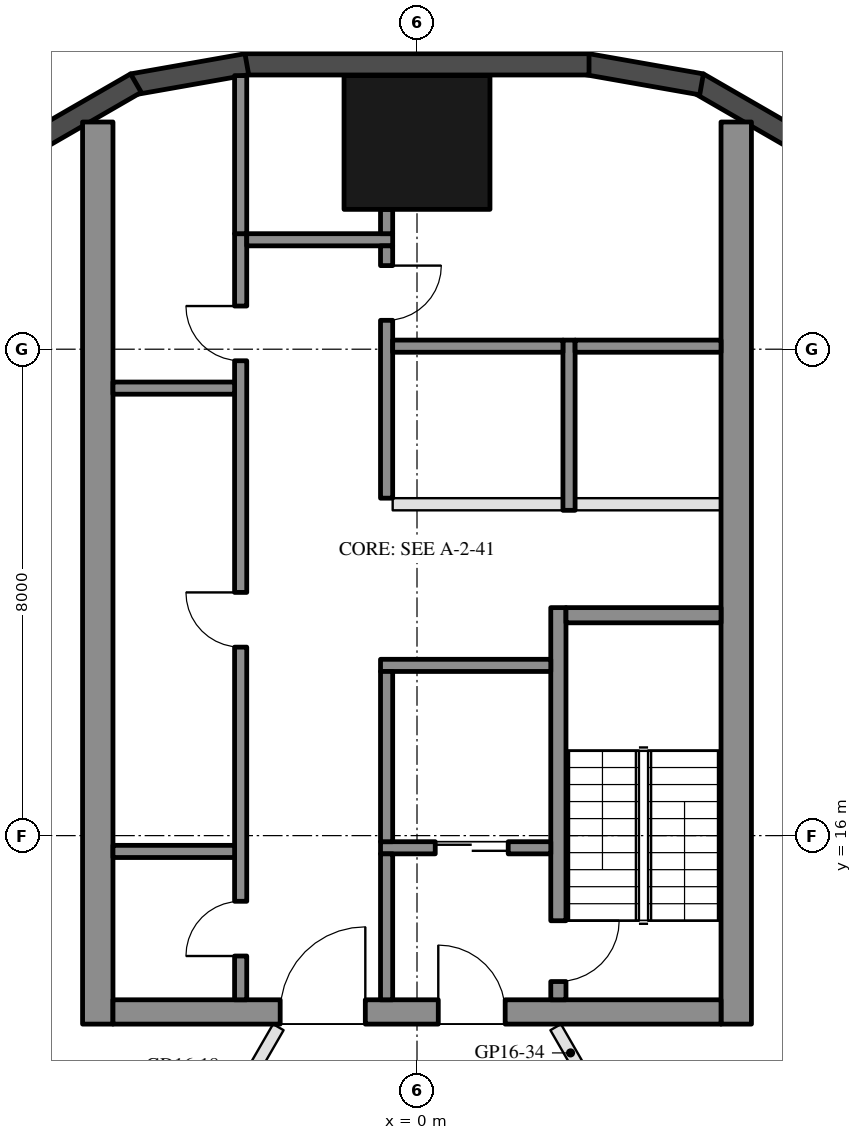
"""IFC4 building model, lengths in metres.
Left out: names, types, materials, properties, quantities, classifications, styles, units other than length and angle.
Written with IfcOpenShell. Run it as: python <this file> out.ifc"""

import sys

from ifc_helpers import new_model, si_unit, direction, frame, frame_2d, origin, origin_2d, place, context, subcontext, project, spatial, rectangle, hollow_rectangle, extrude, element, fill, save


model = new_model("IFC4")
c1 = context("Model", 3, precision=1e-05, world=origin(), true_north=direction((0.0, 1.0)))
c2 = subcontext(c1, "Body", "Model", "MODEL_VIEW")
j1 = project(units=[si_unit("LENGTHUNIT", "METRE"), si_unit("PLANEANGLEUNIT", "RADIAN")], contexts=[c1])
p1 = place(None, origin())
s1 = spatial("IfcSite", under=j1, at=p1, CompositionType="ELEMENT")
p2 = place(p1, origin())
s2 = spatial("IfcBuilding", under=s1, at=p2, CompositionType="ELEMENT")
p3 = place(p2, frame((0.0, 0.0, 176.2)))
s3 = spatial("IfcBuildingStorey", under=s2, at=p3, CompositionType="ELEMENT", Elevation=176.2)
p4 = place(p3, frame((0.0, 27.4, 0.0), z_axis=(0.0, 0.0, 1.0), x_axis=(1.0, 0.0, 0.0)))
e1 = element("IfcColumn", 1, at=p4, inside=s3, PredefinedType="COLUMN", context=c2, shape_type="SweptSolid", body=[
    extrude(hollow_rectangle(XDim=2.4, YDim=2.2, WallThickness=0.06, at=origin_2d()), origin(), (0.0, 0.0, 1.0), 3.7),
])
for number, where, z_axis, x_axis in (
    (2, (6.277, 27.422, 0.0), (0.0, 0.0, 1.0), (-0.866, 0.5, 0.0)),
    (3, (4.68, 28.356, 0.0), (0.0, 0.0, 1.0), (-0.985, 0.174, 0.0)),
):
    element("IfcWall", number, at=place(p3, frame(where, z_axis=z_axis, x_axis=x_axis)), inside=s3, PredefinedType="SOLIDWALL", context=c2, shape_type="SweptSolid", body=[
        extrude(rectangle(XDim=1.91, YDim=0.35, at=frame_2d((0.955, 0.0))), origin(), (0.0, 0.0, 1.0), 3.55),
    ])
p5 = place(p3, frame((2.829, 28.685, 0.0), z_axis=(0.0, 0.0, 1.0), x_axis=(-1.0, 0.0, 0.0)))
e4 = element("IfcWall", 4, at=p5, inside=s3, PredefinedType="SOLIDWALL", context=c2, shape_type="SweptSolid", body=[
    extrude(rectangle(XDim=5.658, YDim=0.35, at=frame_2d((2.829, 0.0))), origin(), (0.0, 0.0, 1.0), 3.55),
])
for number, where, z_axis, x_axis in (
    (5, (-2.799, 28.688, 0.0), (0.0, 0.0, 1.0), (-0.985, -0.174, 0.0)),
    (6, (-4.623, 28.377, 0.0), (0.0, 0.0, 1.0), (-0.866, -0.5, 0.0)),
):
    element("IfcWall", number, at=place(p3, frame(where, z_axis=z_axis, x_axis=x_axis)), inside=s3, PredefinedType="SOLIDWALL", context=c2, shape_type="SweptSolid", body=[
        extrude(rectangle(XDim=1.91, YDim=0.35, at=frame_2d((0.955, 0.0))), origin(), (0.0, 0.0, 1.0), 3.55),
    ])
for number, where, z_axis, x_axis in (
    (7, (5.25, 12.9, 0.0), (0.0, 0.0, 1.0), (0.0, 1.0, 0.0)),
    (8, (-5.25, 12.9, 0.0), (0.0, 0.0, 1.0), (0.0, 1.0, 0.0)),
):
    element("IfcWall", number, at=place(p3, frame(where, z_axis=z_axis, x_axis=x_axis)), inside=s3, PredefinedType="SHEAR", context=c2, shape_type="SweptSolid", body=[
        extrude(rectangle(XDim=14.837, YDim=0.5, at=frame_2d((7.418, 0.0))), origin(), (0.0, 0.0, 1.0), 3.5),
    ])
p6 = place(p3, frame((5.0, 13.1, 0.0), z_axis=(0.0, 0.0, 1.0), x_axis=(-1.0, 0.0, 0.0)))
e9 = element("IfcWall", 9, at=p6, inside=s3, PredefinedType="SHEAR", context=c2, shape_type="SweptSolid", body=[
    extrude(rectangle(XDim=10.0, YDim=0.4, at=frame_2d((5.0, 0.0))), origin(), (0.0, 0.0, 1.0), 3.5),
])
p7 = place(p6, frame((3.55, 0.0, 0.0)))
e10 = element("IfcOpeningElement", 10, at=p7, cuts=e9, PredefinedType="OPENING", context=c2, shape_type="SweptSolid", body=[
    extrude(rectangle(XDim=1.1, YDim=2.1, at=frame_2d((0.55, 1.05))), frame((0.0, 0.21, 0.0), z_axis=(0.0, -1.0, 0.0), x_axis=(1.0, 0.0, 0.0)), (0.0, 0.0, 1.0), 0.42),
])
p8 = place(p6, frame((5.85, 0.0, 0.0)))
e11 = element("IfcOpeningElement", 11, at=p8, cuts=e9, PredefinedType="OPENING", context=c2, shape_type="SweptSolid", body=[
    extrude(rectangle(XDim=1.4, YDim=2.1, at=frame_2d((0.7, 1.05))), frame((0.0, 0.21, 0.0), z_axis=(0.0, -1.0, 0.0), x_axis=(1.0, 0.0, 0.0)), (0.0, 0.0, 1.0), 0.42),
])
p9 = place(p3, frame((2.325, 13.3, 0.0), z_axis=(0.0, 0.0, 1.0), x_axis=(0.0, 1.0, 0.0)))
e12 = element("IfcWall", 12, at=p9, inside=s3, PredefinedType="SHEAR", context=c2, shape_type="SweptSolid", body=[
    extrude(rectangle(XDim=6.45, YDim=0.25, at=frame_2d((3.225, 0.0))), origin(), (0.0, 0.0, 1.0), 3.5),
])
p10 = place(p9, frame((0.3, 0.0, 0.0)))
e13 = element("IfcOpeningElement", 13, at=p10, cuts=e12, PredefinedType="OPENING", context=c2, shape_type="SweptSolid", body=[
    extrude(rectangle(XDim=1.0, YDim=2.1, at=frame_2d((0.5, 1.05))), frame((0.0, 0.135, 0.0), z_axis=(0.0, -1.0, 0.0), x_axis=(1.0, 0.0, 0.0)), (0.0, 0.0, 1.0), 0.27),
])
p11 = place(p3, frame((5.0, 19.625, 0.0), z_axis=(0.0, 0.0, 1.0), x_axis=(-1.0, 0.0, 0.0)))
e14 = element("IfcWall", 14, at=p11, inside=s3, PredefinedType="SHEAR", context=c2, shape_type="SweptSolid", body=[
    extrude(rectangle(XDim=2.55, YDim=0.25, at=frame_2d((1.275, 0.0))), origin(), (0.0, 0.0, 1.0), 3.5),
])
p12 = place(p3, frame((2.2, 18.8, 0.0), z_axis=(0.0, 0.0, 1.0), x_axis=(-1.0, 0.0, 0.0)))
e15 = element("IfcWall", 15, at=p12, inside=s3, PredefinedType="SHEAR", context=c2, shape_type="SweptSolid", body=[
    extrude(rectangle(XDim=2.8, YDim=0.2, at=frame_2d((1.4, 0.0))), origin(), (0.0, 0.0, 1.0), 3.5),
])
p13 = place(p3, frame((2.2, 15.8, 0.0), z_axis=(0.0, 0.0, 1.0), x_axis=(-1.0, 0.0, 0.0)))
e16 = element("IfcWall", 16, at=p13, inside=s3, PredefinedType="SHEAR", context=c2, shape_type="SweptSolid", body=[
    extrude(rectangle(XDim=2.8, YDim=0.2, at=frame_2d((1.4, 0.0))), origin(), (0.0, 0.0, 1.0), 3.5),
])
p14 = place(p13, frame((0.7, 0.0, 0.0)))
e17 = element("IfcOpeningElement", 17, at=p14, cuts=e16, PredefinedType="OPENING", context=c2, shape_type="SweptSolid", body=[
    extrude(rectangle(XDim=1.2, YDim=2.1, at=frame_2d((0.6, 1.05))), frame((0.0, 0.11, 0.0), z_axis=(0.0, -1.0, 0.0), x_axis=(1.0, 0.0, 0.0)), (0.0, 0.0, 1.0), 0.22),
])
p15 = place(p3, frame((-0.5, 15.9, 0.0), z_axis=(0.0, 0.0, 1.0), x_axis=(0.0, 1.0, 0.0)))
e18 = element("IfcWall", 18, at=p15, inside=s3, PredefinedType="SHEAR", context=c2, shape_type="SweptSolid", body=[
    extrude(rectangle(XDim=2.8, YDim=0.2, at=frame_2d((1.4, 0.0))), origin(), (0.0, 0.0, 1.0), 3.5),
])
p16 = place(p3, frame((-0.5, 13.3, 0.0), z_axis=(0.0, 0.0, 1.0), x_axis=(0.0, 1.0, 0.0)))
e19 = element("IfcWall", 19, at=p16, inside=s3, PredefinedType="SHEAR", context=c2, shape_type="SweptSolid", body=[
    extrude(rectangle(XDim=2.4, YDim=0.2, at=frame_2d((1.2, 0.0))), origin(), (0.0, 0.0, 1.0), 3.5),
])
p17 = place(p3, frame((-2.9, 13.3, 0.0), z_axis=(0.0, 0.0, 1.0), x_axis=(0.0, 1.0, 0.0)))
e20 = element("IfcWall", 20, at=p17, inside=s3, PredefinedType="SHEAR", context=c2, shape_type="SweptSolid", body=[
    extrude(rectangle(XDim=12.6, YDim=0.2, at=frame_2d((6.3, 0.0))), origin(), (0.0, 0.0, 1.0), 3.5),
])
p18 = place(p17, frame((0.72, 0.0, 0.0)))
e21 = element("IfcOpeningElement", 21, at=p18, cuts=e20, PredefinedType="OPENING", context=c2, shape_type="SweptSolid", body=[
    extrude(rectangle(XDim=0.9, YDim=2.1, at=frame_2d((0.45, 1.05))), frame((0.0, 0.11, 0.0), z_axis=(0.0, -1.0, 0.0), x_axis=(1.0, 0.0, 0.0)), (0.0, 0.0, 1.0), 0.22),
])
p19 = place(p17, frame((5.8, 0.0, 0.0)))
e22 = element("IfcOpeningElement", 22, at=p19, cuts=e20, PredefinedType="OPENING", context=c2, shape_type="SweptSolid", body=[
    extrude(rectangle(XDim=0.9, YDim=2.1, at=frame_2d((0.45, 1.05))), frame((0.0, 0.11, 0.0), z_axis=(0.0, -1.0, 0.0), x_axis=(1.0, 0.0, 0.0)), (0.0, 0.0, 1.0), 0.22),
])
p20 = place(p17, frame((10.51, 0.0, 0.0)))
e23 = element("IfcOpeningElement", 23, at=p20, cuts=e20, PredefinedType="OPENING", context=c2, shape_type="SweptSolid", body=[
    extrude(rectangle(XDim=0.9, YDim=2.1, at=frame_2d((0.45, 1.05))), frame((0.0, 0.11, 0.0), z_axis=(0.0, -1.0, 0.0), x_axis=(1.0, 0.0, 0.0)), (0.0, 0.0, 1.0), 0.22),
])
p21 = place(p3, frame((-0.4, 25.8, 0.0), z_axis=(0.0, 0.0, 1.0), x_axis=(-1.0, 0.0, 0.0)))
e24 = element("IfcWall", 24, at=p21, inside=s3, PredefinedType="SHEAR", context=c2, shape_type="SweptSolid", body=[
    extrude(rectangle(XDim=2.4, YDim=0.2, at=frame_2d((1.2, 0.0))), origin(), (0.0, 0.0, 1.0), 3.5),
])
p22 = place(p3, frame((-0.5, 21.55, 0.0), z_axis=(0.0, 0.0, 1.0), x_axis=(0.0, 1.0, 0.0)))
e25 = element("IfcWall", 25, at=p22, inside=s3, PredefinedType="SHEAR", context=c2, shape_type="SweptSolid", body=[
    extrude(rectangle(XDim=4.15, YDim=0.2, at=frame_2d((2.075, 0.0))), origin(), (0.0, 0.0, 1.0), 3.5),
])
p23 = place(p22, frame((2.925, 0.0, 0.0)))
e26 = element("IfcOpeningElement", 26, at=p23, cuts=e25, PredefinedType="OPENING", context=c2, shape_type="SweptSolid", body=[
    extrude(rectangle(XDim=0.9, YDim=2.1, at=frame_2d((0.45, 1.05))), frame((0.0, 0.11, 0.0), z_axis=(0.0, -1.0, 0.0), x_axis=(1.0, 0.0, 0.0)), (0.0, 0.0, 1.0), 0.22),
])
for number, where, z_axis, x_axis in (
    (27, (-3.0, 15.74, 0.0), (0.0, 0.0, 1.0), (-1.0, 0.0, 0.0)),
    (28, (-3.0, 23.36, 0.0), (0.0, 0.0, 1.0), (-1.0, 0.0, 0.0)),
):
    element("IfcWall", number, at=place(p3, frame(where, z_axis=z_axis, x_axis=x_axis)), inside=s3, PredefinedType="SHEAR", context=c2, shape_type="SweptSolid", body=[
        extrude(rectangle(XDim=2.0, YDim=0.2, at=frame_2d((1.0, 0.0))), origin(), (0.0, 0.0, 1.0), 3.5),
    ])
p24 = place(p3, frame((-0.5, 25.9, 0.0), z_axis=(0.0, 0.0, 1.0), x_axis=(0.0, 1.0, 0.0)))
e29 = element("IfcWall", 29, at=p24, inside=s3, PredefinedType="SHEAR", context=c2, shape_type="SweptSolid", body=[
    extrude(rectangle(XDim=0.4, YDim=0.2, at=frame_2d((0.2, 0.0))), origin(), (0.0, 0.0, 1.0), 3.5),
])
p25 = place(p3, frame((-2.9, 25.9, 0.0), z_axis=(0.0, 0.0, 1.0), x_axis=(0.0, 1.0, 0.0)))
e30 = element("IfcWall", 30, at=p25, inside=s3, PredefinedType="SHEAR", context=c2, shape_type="SweptSolid", body=[
    extrude(rectangle(XDim=2.6, YDim=0.2, at=frame_2d((1.3, 0.0))), origin(), (0.0, 0.0, 1.0), 3.5),
])
p26 = place(p3, frame((2.5, 21.35, 0.0), z_axis=(0.0, 0.0, 1.0), x_axis=(0.0, 1.0, 0.0)))
e31 = element("IfcWall", 31, at=p26, inside=s3, PredefinedType="SHEAR", context=c2, shape_type="SweptSolid", body=[
    extrude(rectangle(XDim=2.8, YDim=0.2, at=frame_2d((1.4, 0.0))), origin(), (0.0, 0.0, 1.0), 3.5),
])
p27 = place(p3, frame((5.0, 24.05, 0.0), z_axis=(0.0, 0.0, 1.0), x_axis=(-1.0, 0.0, 0.0)))
e32 = element("IfcWall", 32, at=p27, inside=s3, PredefinedType="SHEAR", context=c2, shape_type="SweptSolid", body=[
    extrude(rectangle(XDim=2.4, YDim=0.2, at=frame_2d((1.2, 0.0))), origin(), (0.0, 0.0, 1.0), 3.5),
])
p28 = place(p3, frame((2.4, 24.05, 0.0), z_axis=(0.0, 0.0, 1.0), x_axis=(-1.0, 0.0, 0.0)))
e33 = element("IfcWall", 33, at=p28, inside=s3, PredefinedType="SHEAR", context=c2, shape_type="SweptSolid", body=[
    extrude(rectangle(XDim=2.8, YDim=0.2, at=frame_2d((1.4, 0.0))), origin(), (0.0, 0.0, 1.0), 3.5),
])
p29 = place(p3, frame((5.0, 21.45, 0.0), z_axis=(0.0, 0.0, 1.0), x_axis=(-1.0, 0.0, 0.0)))
e34 = element("IfcWall", 34, at=p29, inside=s3, PredefinedType="PARTITIONING", context=c2, shape_type="SweptSolid", body=[
    extrude(rectangle(XDim=2.4, YDim=0.2, at=frame_2d((1.2, 0.0))), origin(), (0.0, 0.0, 1.0), 3.5),
])
p30 = place(p3, frame((2.4, 21.45, 0.0), z_axis=(0.0, 0.0, 1.0), x_axis=(-1.0, 0.0, 0.0)))
e35 = element("IfcWall", 35, at=p30, inside=s3, PredefinedType="PARTITIONING", context=c2, shape_type="SweptSolid", body=[
    extrude(rectangle(XDim=2.8, YDim=0.2, at=frame_2d((1.4, 0.0))), origin(), (0.0, 0.0, 1.0), 3.5),
])
p31 = place(p3, frame((14.377, 13.658, 0.0), z_axis=(0.0, 0.0, 1.0), x_axis=(-0.914546661299, -0.404480412762, 0.0)))
e36 = element("IfcWall", 36, at=p31, inside=s3, PredefinedType="PARTITIONING", context=c2, shape_type="SweptSolid", body=[
    extrude(rectangle(XDim=11.043, YDim=0.2, at=frame_2d((5.521, 0.0))), origin(), (0.0, 0.0, 1.0), 3.06),
])
p32 = place(p3, frame((-13.467, 13.434, 0.0), z_axis=(0.0, 0.0, 1.0), x_axis=(0.916026348045, -0.401118099426, 0.0)))
e37 = element("IfcWall", 37, at=p32, inside=s3, PredefinedType="PARTITIONING", context=c2, shape_type="SweptSolid", body=[
    extrude(rectangle(XDim=10.142, YDim=0.2, at=frame_2d((5.071, 0.0))), origin(), (0.0, 0.0, 1.0), 3.06),
])
p33 = place(p3, frame((2.281, 12.85, 0.0), z_axis=(0.0, 0.0, 1.0), x_axis=(0.499971273698, -0.866041988288, 0.0)))
e38 = element("IfcWall", 38, at=p33, inside=s3, PredefinedType="PARTITIONING", context=c2, shape_type="SweptSolid", body=[
    extrude(rectangle(XDim=4.077, YDim=0.2, at=frame_2d((2.039, 0.0))), origin(), (0.0, 0.0, 1.0), 2.95),
])
p34 = place(p33, frame((1.538, 0.0, 0.0)))
e39 = element("IfcOpeningElement", 39, at=p34, cuts=e38, PredefinedType="OPENING", context=c2, shape_type="SweptSolid", body=[
    extrude(rectangle(XDim=1.0, YDim=2.1, at=frame_2d((0.5, 1.05))), frame((0.0, 0.11, 0.0), z_axis=(0.0, -1.0, 0.0), x_axis=(1.0, 0.0, 0.0)), (0.0, 0.0, 1.0), 0.22),
])
p35 = place(p3, frame((-4.219, 9.493, 0.0), z_axis=(0.0, 0.0, 1.0), x_axis=(0.499993219391, 0.866029318535, 0.0)))
e40 = element("IfcWall", 40, at=p35, inside=s3, PredefinedType="PARTITIONING", context=c2, shape_type="SweptSolid", body=[
    extrude(rectangle(XDim=3.876, YDim=0.2, at=frame_2d((1.938, 0.0))), origin(), (0.0, 0.0, 1.0), 2.95),
])
p36 = place(p35, frame((1.438, 0.0, 0.0)))
e41 = element("IfcOpeningElement", 41, at=p36, cuts=e40, PredefinedType="OPENING", context=c2, shape_type="SweptSolid", body=[
    extrude(rectangle(XDim=1.0, YDim=2.1, at=frame_2d((0.5, 1.05))), frame((0.0, 0.11, 0.0), z_axis=(0.0, -1.0, 0.0), x_axis=(1.0, 0.0, 0.0)), (0.0, 0.0, 1.0), 0.22),
])
p37 = place(p14, origin())
e42 = element("IfcDoor", 42, at=p37, inside=s3, OperationType="DOUBLE_DOOR_SLIDING", PredefinedType="DOOR", context=c2, shape_type="SweptSolid", body=[
    extrude(rectangle(XDim=1.2, YDim=2.1, at=frame_2d((0.6, 1.05))), frame((0.0, 0.025, 0.0), z_axis=(0.0, -1.0, 0.0), x_axis=(1.0, 0.0, 0.0)), (0.0, 0.0, 1.0), 0.05),
])
fill(e17, e42)
p38 = place(p18, origin())
e43 = element("IfcDoor", 43, at=p38, inside=s3, OperationType="SINGLE_SWING_LEFT", PredefinedType="DOOR", context=c2, shape_type="SweptSolid", body=[
    extrude(rectangle(XDim=0.9, YDim=2.1, at=frame_2d((0.45, 1.05))), frame((0.0, 0.025, 0.0), z_axis=(0.0, -1.0, 0.0), x_axis=(1.0, 0.0, 0.0)), (0.0, 0.0, 1.0), 0.05),
])
fill(e21, e43)
p39 = place(p19, origin())
e44 = element("IfcDoor", 44, at=p39, inside=s3, OperationType="SINGLE_SWING_RIGHT", PredefinedType="DOOR", context=c2, shape_type="SweptSolid", body=[
    extrude(rectangle(XDim=0.9, YDim=2.1, at=frame_2d((0.45, 1.05))), frame((0.0, 0.025, 0.0), z_axis=(0.0, -1.0, 0.0), x_axis=(1.0, 0.0, 0.0)), (0.0, 0.0, 1.0), 0.05),
])
fill(e22, e44)
p40 = place(p20, origin())
e45 = element("IfcDoor", 45, at=p40, inside=s3, OperationType="SINGLE_SWING_RIGHT", PredefinedType="DOOR", context=c2, shape_type="SweptSolid", body=[
    extrude(rectangle(XDim=0.9, YDim=2.1, at=frame_2d((0.45, 1.05))), frame((0.0, 0.025, 0.0), z_axis=(0.0, -1.0, 0.0), x_axis=(1.0, 0.0, 0.0)), (0.0, 0.0, 1.0), 0.05),
])
fill(e23, e45)
p41 = place(p23, frame((0.9, 0.0, 0.0), z_axis=(0.0, 0.0, 1.0), x_axis=(-1.0, 0.0, 0.0)))
e46 = element("IfcDoor", 46, at=p41, inside=s3, OperationType="SINGLE_SWING_LEFT", PredefinedType="DOOR", context=c2, shape_type="SweptSolid", body=[
    extrude(rectangle(XDim=0.9, YDim=2.1, at=frame_2d((0.45, 1.05))), frame((0.0, 0.025, 0.0), z_axis=(0.0, -1.0, 0.0), x_axis=(1.0, 0.0, 0.0)), (0.0, 0.0, 1.0), 0.05),
])
fill(e26, e46)
p42 = place(p7, frame((1.1, 0.0, 0.0), z_axis=(0.0, 0.0, 1.0), x_axis=(-1.0, 0.0, 0.0)))
e47 = element("IfcDoor", 47, at=p42, inside=s3, OperationType="SINGLE_SWING_LEFT", PredefinedType="DOOR", context=c2, shape_type="SweptSolid", body=[
    extrude(rectangle(XDim=1.1, YDim=2.1, at=frame_2d((0.55, 1.05))), frame((0.0, 0.025, 0.0), z_axis=(0.0, -1.0, 0.0), x_axis=(1.0, 0.0, 0.0)), (0.0, 0.0, 1.0), 0.05),
])
fill(e10, e47)
p43 = place(p8, frame((1.4, 0.0, 0.0), z_axis=(0.0, 0.0, 1.0), x_axis=(-1.0, 0.0, 0.0)))
e48 = element("IfcDoor", 48, at=p43, inside=s3, OperationType="DOUBLE_DOOR_SINGLE_SWING", PredefinedType="DOOR", context=c2, shape_type="SweptSolid", body=[
    extrude(rectangle(XDim=1.4, YDim=2.1, at=frame_2d((0.7, 1.05))), frame((0.0, 0.025, 0.0), z_axis=(0.0, -1.0, 0.0), x_axis=(1.0, 0.0, 0.0)), (0.0, 0.0, 1.0), 0.05),
])
fill(e11, e48)
p44 = place(p10, frame((1.0, 0.0, 0.0), z_axis=(0.0, 0.0, 1.0), x_axis=(-1.0, 0.0, 0.0)))
e49 = element("IfcDoor", 49, at=p44, inside=s3, OperationType="SINGLE_SWING_LEFT", PredefinedType="DOOR", context=c2, shape_type="SweptSolid", body=[
    extrude(rectangle(XDim=1.0, YDim=2.1, at=frame_2d((0.5, 1.05))), frame((0.0, 0.025, 0.0), z_axis=(0.0, -1.0, 0.0), x_axis=(1.0, 0.0, 0.0)), (0.0, 0.0, 1.0), 0.05),
])
fill(e13, e49)
save(model, sys.argv[1])
